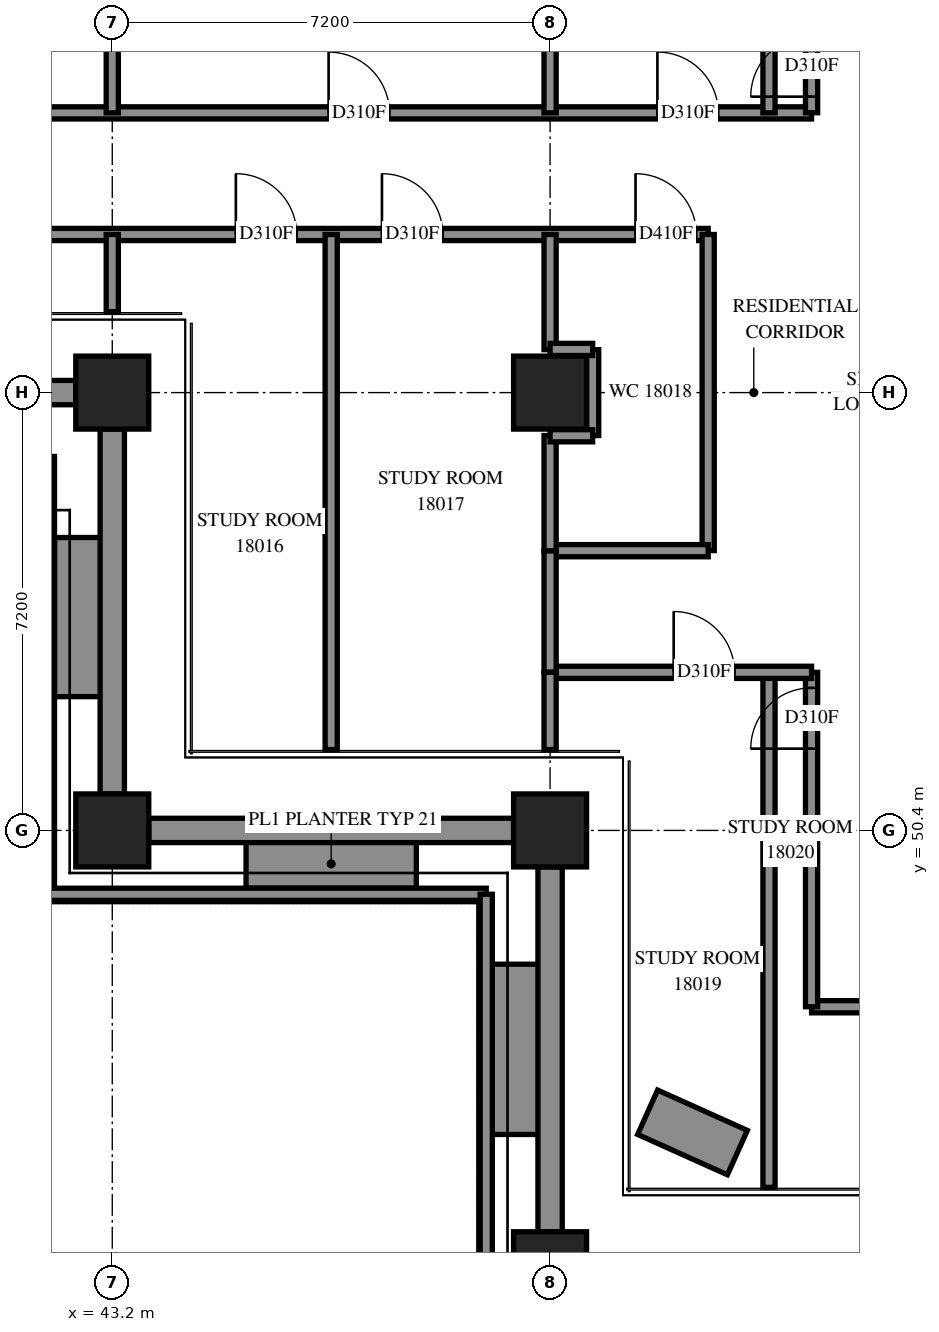
"""IFC4 building model, lengths in metres.
Left out: names, types, materials, properties, quantities, classifications, styles, units other than length and angle.
Written with IfcOpenShell. Run it as: python <this file> out.ifc"""

import sys

from ifc_helpers import new_model, si_unit, direction, frame, frame_2d, origin, origin_2d, place, context, subcontext, project, spatial, polyline, rectangle, outline, extrude, element, fill, save


model = new_model("IFC4")
c1 = context("Model", 3, precision=1e-05, world=origin(), true_north=direction((0.0, 1.0)))
c2 = subcontext(c1, "Body", "Model", "MODEL_VIEW")
j1 = project(units=[si_unit("LENGTHUNIT", "METRE"), si_unit("PLANEANGLEUNIT", "RADIAN")], contexts=[c1])
p1 = place(None, origin())
s1 = spatial("IfcSite", under=j1, at=p1, CompositionType="ELEMENT")
p2 = place(p1, origin())
s2 = spatial("IfcBuilding", under=s1, at=p2, CompositionType="ELEMENT")
p3 = place(p2, frame((0.0, 0.0, 67.8)))
s3 = spatial("IfcBuildingStorey", under=s2, at=p3, CompositionType="ELEMENT", Elevation=67.8)
for number, where, z_axis, x_axis in (
    (1, (43.2, 50.4, 0.0), (0.0, 0.0, 1.0), (1.0, 0.0, 0.0)),
    (2, (43.2, 57.6, 0.0), (0.0, 0.0, 1.0), (1.0, 0.0, 0.0)),
    (3, (50.4, 43.2, 0.0), (0.0, 0.0, 1.0), (1.0, 0.0, 0.0)),
    (4, (50.4, 50.4, 0.0), (0.0, 0.0, 1.0), (1.0, 0.0, 0.0)),
    (5, (50.4, 57.6, 0.0), (0.0, 0.0, 1.0), (1.0, 0.0, 0.0)),
):
    element("IfcColumn", number, at=place(p3, frame(where, z_axis=z_axis, x_axis=x_axis)), inside=s3, PredefinedType="COLUMN", context=c2, shape_type="SweptSolid", body=[
        extrude(rectangle(XDim=1.2, YDim=1.2, at=origin_2d()), origin(), (0.0, 0.0, 1.0), 3.9),
    ])
p4 = place(p3, frame((42.65, 55.217, 0.0), z_axis=(0.0, 0.0, 1.0), x_axis=(0.0, -1.0, 0.0)))
e6 = element("IfcWall", 6, at=p4, inside=s3, PredefinedType="SOLIDWALL", context=c2, shape_type="SweptSolid", body=[
    extrude(rectangle(XDim=2.617, YDim=0.8, at=frame_2d((1.308, 0.0))), origin(), (0.0, 0.0, 1.0), 0.65),
])
for number, where, z_axis, x_axis in (
    (7, (45.4, 49.85, 0.0), (0.0, 0.0, 1.0), (1.0, 0.0, 0.0)),
    (8, (49.85, 48.2, 0.0), (0.0, 0.0, 1.0), (0.0, -1.0, 0.0)),
):
    element("IfcWall", number, at=place(p3, frame(where, z_axis=z_axis, x_axis=x_axis)), inside=s3, PredefinedType="SOLIDWALL", context=c2, shape_type="SweptSolid", body=[
        extrude(rectangle(XDim=2.8, YDim=0.8, at=frame_2d((1.4, 0.0))), origin(), (0.0, 0.0, 1.0), 0.65),
    ])
p5 = place(p3, frame((53.48, 45.102, 0.0), z_axis=(0.0, 0.0, 1.0), x_axis=(-0.9121191364, 0.4099252139, 0.0)))
e9 = element("IfcWall", 9, at=p5, inside=s3, PredefinedType="SOLIDWALL", context=c2, shape_type="SweptSolid", body=[
    extrude(rectangle(XDim=1.618, YDim=0.8, at=frame_2d((0.809, 0.0))), origin(), (0.0, 0.0, 1.0), 0.65),
])
p6 = place(p3, frame((27.75, 56.55, 0.0), z_axis=(0.0, 0.0, 1.0), x_axis=(1.0, 0.0, 0.0)))
e10 = element("IfcWall", 10, at=p6, inside=s3, PredefinedType="SOLIDWALL", context=c2, shape_type="SweptSolid", body=[
    extrude(outline(polyline([(-0.1, -0.1), (14.3, -0.1), (14.5, 0.1), (0.1, 0.1), (-0.1, -0.1)])), origin(), (0.0, 0.0, 1.0), 4.2),
])
p7 = place(p3, frame((42.15, 56.55, 0.0), z_axis=(0.0, 0.0, 1.0), x_axis=(0.0, -1.0, 0.0)))
e11 = element("IfcWall", 11, at=p7, inside=s3, PredefinedType="SOLIDWALL", context=c2, shape_type="SweptSolid", body=[
    extrude(outline(polyline([(0.1, -0.1), (7.3, -0.1), (7.1, 0.1), (-0.1, 0.1), (0.1, -0.1)])), origin(), (0.0, 0.0, 1.0), 4.2),
])
p8 = place(p3, frame((42.15, 49.35, 0.0), z_axis=(0.0, 0.0, 1.0), x_axis=(1.0, 0.0, 0.0)))
e12 = element("IfcWall", 12, at=p8, inside=s3, PredefinedType="SOLIDWALL", context=c2, shape_type="SweptSolid", body=[
    extrude(outline(polyline([(-0.1, -0.1), (7.1, -0.1), (7.3, 0.1), (0.1, 0.1), (-0.1, -0.1)])), origin(), (0.0, 0.0, 1.0), 4.2),
])
p9 = place(p3, frame((49.35, 49.35, 0.0), z_axis=(0.0, 0.0, 1.0), x_axis=(0.0, -1.0, 0.0)))
e13 = element("IfcWall", 13, at=p9, inside=s3, PredefinedType="SOLIDWALL", context=c2, shape_type="SweptSolid", body=[
    extrude(outline(polyline([(0.1, -0.1), (7.3, -0.1), (7.1, 0.1), (-0.1, 0.1), (0.1, -0.1)])), origin(), (0.0, 0.0, 1.0), 4.2),
])
p10 = place(p3, frame((30.6, 60.2, 0.0), z_axis=(0.0, 0.0, 1.0), x_axis=(1.0, 0.0, 0.0)))
e14 = element("IfcWall", 14, at=p10, inside=s3, PredefinedType="PARTITIONING", context=c2, shape_type="SweptSolid", body=[
    extrude(rectangle(XDim=22.4, YDim=0.2, at=frame_2d((11.2, 0.0))), origin(), (0.0, 0.0, 1.0), 3.9),
])
p11 = place(p10, frame((6.254, 0.0, 0.0)))
e15 = element("IfcOpeningElement", 15, at=p11, cuts=e14, PredefinedType="OPENING", context=c2, shape_type="SweptSolid", body=[
    extrude(rectangle(XDim=1.0, YDim=2.1, at=frame_2d((0.5, 1.05))), frame((0.0, 0.11, 0.0), z_axis=(0.0, -1.0, 0.0), x_axis=(1.0, 0.0, 0.0)), (0.0, 0.0, 1.0), 0.22),
])
p12 = place(p10, frame((14.633, 0.0, 0.0)))
e16 = element("IfcOpeningElement", 16, at=p12, cuts=e14, PredefinedType="OPENING", context=c2, shape_type="SweptSolid", body=[
    extrude(rectangle(XDim=1.0, YDim=2.1, at=frame_2d((0.5, 1.05))), frame((0.0, 0.11, 0.0), z_axis=(0.0, -1.0, 0.0), x_axis=(1.0, 0.0, 0.0)), (0.0, 0.0, 1.0), 0.22),
])
p13 = place(p10, frame((17.035, 0.0, 0.0)))
e17 = element("IfcOpeningElement", 17, at=p13, cuts=e14, PredefinedType="OPENING", context=c2, shape_type="SweptSolid", body=[
    extrude(rectangle(XDim=1.0, YDim=2.1, at=frame_2d((0.5, 1.05))), frame((0.0, 0.11, 0.0), z_axis=(0.0, -1.0, 0.0), x_axis=(1.0, 0.0, 0.0)), (0.0, 0.0, 1.0), 0.22),
])
p14 = place(p10, frame((21.205, 0.0, 0.0)))
e18 = element("IfcOpeningElement", 18, at=p14, cuts=e14, PredefinedType="OPENING", context=c2, shape_type="SweptSolid", body=[
    extrude(rectangle(XDim=1.0, YDim=2.1, at=frame_2d((0.5, 1.05))), frame((0.0, 0.11, 0.0), z_axis=(0.0, -1.0, 0.0), x_axis=(1.0, 0.0, 0.0)), (0.0, 0.0, 1.0), 0.22),
])
p15 = place(p3, frame((33.4, 62.2, 0.0), z_axis=(0.0, 0.0, 1.0), x_axis=(1.0, 0.0, 0.0)))
e19 = element("IfcWall", 19, at=p15, inside=s3, PredefinedType="PARTITIONING", context=c2, shape_type="SweptSolid", body=[
    extrude(rectangle(XDim=21.3, YDim=0.2, at=frame_2d((10.65, 0.0))), origin(), (0.0, 0.0, 1.0), 3.9),
])
p16 = place(p15, frame((6.157, 0.0, 0.0)))
e20 = element("IfcOpeningElement", 20, at=p16, cuts=e19, PredefinedType="OPENING", context=c2, shape_type="SweptSolid", body=[
    extrude(rectangle(XDim=1.0, YDim=2.1, at=frame_2d((0.5, 1.05))), frame((0.0, 0.11, 0.0), z_axis=(0.0, -1.0, 0.0), x_axis=(1.0, 0.0, 0.0)), (0.0, 0.0, 1.0), 0.22),
])
p17 = place(p15, frame((13.357, 0.0, 0.0)))
e21 = element("IfcOpeningElement", 21, at=p17, cuts=e19, PredefinedType="OPENING", context=c2, shape_type="SweptSolid", body=[
    extrude(rectangle(XDim=1.0, YDim=2.1, at=frame_2d((0.5, 1.05))), frame((0.0, 0.11, 0.0), z_axis=(0.0, -1.0, 0.0), x_axis=(1.0, 0.0, 0.0)), (0.0, 0.0, 1.0), 0.22),
])
p18 = place(p15, frame((18.765, 0.0, 0.0)))
e22 = element("IfcOpeningElement", 22, at=p18, cuts=e19, PredefinedType="OPENING", context=c2, shape_type="SweptSolid", body=[
    extrude(rectangle(XDim=1.0, YDim=2.1, at=frame_2d((0.5, 1.05))), frame((0.0, 0.11, 0.0), z_axis=(0.0, -1.0, 0.0), x_axis=(1.0, 0.0, 0.0)), (0.0, 0.0, 1.0), 0.22),
])
p19 = place(p3, frame((54.7, 47.5, 0.0), z_axis=(0.0, 0.0, 1.0), x_axis=(1.0, 0.0, 0.0)))
e23 = element("IfcWall", 23, at=p19, inside=s3, PredefinedType="PARTITIONING", context=c2, shape_type="SweptSolid", body=[
    extrude(rectangle(XDim=19.442, YDim=0.2, at=frame_2d((9.721, 0.0))), origin(), (0.0, 0.0, 1.0), 3.9),
])
p20 = place(p19, frame((4.933, 0.0, 0.0)))
e24 = element("IfcOpeningElement", 24, at=p20, cuts=e23, PredefinedType="OPENING", context=c2, shape_type="SweptSolid", body=[
    extrude(rectangle(XDim=1.0, YDim=2.1, at=frame_2d((0.5, 1.05))), frame((0.0, 0.11, 0.0), z_axis=(0.0, -1.0, 0.0), x_axis=(1.0, 0.0, 0.0)), (0.0, 0.0, 1.0), 0.22),
])
p21 = place(p19, frame((7.008, 0.0, 0.0)))
e25 = element("IfcOpeningElement", 25, at=p21, cuts=e23, PredefinedType="OPENING", context=c2, shape_type="SweptSolid", body=[
    extrude(rectangle(XDim=1.0, YDim=2.1, at=frame_2d((0.5, 1.05))), frame((0.0, 0.11, 0.0), z_axis=(0.0, -1.0, 0.0), x_axis=(1.0, 0.0, 0.0)), (0.0, 0.0, 1.0), 0.22),
])
p22 = place(p19, frame((12.133, 0.0, 0.0)))
e26 = element("IfcOpeningElement", 26, at=p22, cuts=e23, PredefinedType="OPENING", context=c2, shape_type="SweptSolid", body=[
    extrude(rectangle(XDim=1.0, YDim=2.1, at=frame_2d((0.5, 1.05))), frame((0.0, 0.11, 0.0), z_axis=(0.0, -1.0, 0.0), x_axis=(1.0, 0.0, 0.0)), (0.0, 0.0, 1.0), 0.22),
])
p23 = place(p19, frame((14.207, 0.0, 0.0)))
e27 = element("IfcOpeningElement", 27, at=p23, cuts=e23, PredefinedType="OPENING", context=c2, shape_type="SweptSolid", body=[
    extrude(rectangle(XDim=1.0, YDim=2.1, at=frame_2d((0.5, 1.05))), frame((0.0, 0.11, 0.0), z_axis=(0.0, -1.0, 0.0), x_axis=(1.0, 0.0, 0.0)), (0.0, 0.0, 1.0), 0.22),
])
for number, where, z_axis, x_axis in (
    (28, (46.8, 51.73, 0.0), (0.0, 0.0, 1.0), (0.0, 1.0, 0.0)),
    (29, (54.0, 44.53, 0.0), (0.0, 0.0, 1.0), (0.0, 1.0, 0.0)),
    (30, (54.0, 62.2, 0.0), (0.0, 0.0, 1.0), (0.0, 1.0, 0.0)),
):
    element("IfcWall", number, at=place(p3, frame(where, z_axis=z_axis, x_axis=x_axis)), inside=s3, PredefinedType="PARTITIONING", context=c2, shape_type="SweptSolid", body=[
        extrude(rectangle(XDim=8.47, YDim=0.2, at=frame_2d((4.235, 0.0))), origin(), (0.0, 0.0, 1.0), 3.9),
    ])
p24 = place(p3, frame((54.7, 47.5, 0.0), z_axis=(0.0, 0.0, 1.0), x_axis=(0.0, 1.0, 0.0)))
e31 = element("IfcWall", 31, at=p24, inside=s3, PredefinedType="PARTITIONING", context=c2, shape_type="SweptSolid", body=[
    extrude(rectangle(XDim=5.5, YDim=0.2, at=frame_2d((2.75, 0.0))), origin(), (0.0, 0.0, 1.0), 3.9),
])
p25 = place(p24, frame((4.245, 0.0, 0.0)))
e32 = element("IfcOpeningElement", 32, at=p25, cuts=e31, PredefinedType="OPENING", context=c2, shape_type="SweptSolid", body=[
    extrude(rectangle(XDim=1.0, YDim=2.1, at=frame_2d((0.5, 1.05))), frame((0.0, 0.11, 0.0), z_axis=(0.0, -1.0, 0.0), x_axis=(1.0, 0.0, 0.0)), (0.0, 0.0, 1.0), 0.22),
])
p26 = place(p3, frame((54.7, 62.202, 0.0), z_axis=(0.0, 0.0, 1.0), x_axis=(0.0, 1.0, 0.0)))
e33 = element("IfcWall", 33, at=p26, inside=s3, PredefinedType="PARTITIONING", context=c2, shape_type="SweptSolid", body=[
    extrude(rectangle(XDim=5.498, YDim=0.2, at=frame_2d((2.749, 0.0))), origin(), (0.0, 0.0, 1.0), 3.9),
])
p27 = place(p26, frame((0.265, 0.0, 0.0)))
e34 = element("IfcOpeningElement", 34, at=p27, cuts=e33, PredefinedType="OPENING", context=c2, shape_type="SweptSolid", body=[
    extrude(rectangle(XDim=1.0, YDim=2.1, at=frame_2d((0.5, 1.05))), frame((0.0, 0.11, 0.0), z_axis=(0.0, -1.0, 0.0), x_axis=(1.0, 0.0, 0.0)), (0.0, 0.0, 1.0), 0.22),
])
p28 = place(p3, frame((53.0, 55.002, 0.0), z_axis=(0.0, 0.0, 1.0), x_axis=(0.0, 1.0, 0.0)))
e35 = element("IfcWall", 35, at=p28, inside=s3, PredefinedType="PARTITIONING", context=c2, shape_type="SweptSolid", body=[
    extrude(rectangle(XDim=5.198, YDim=0.2, at=frame_2d((2.599, 0.0))), origin(), (0.0, 0.0, 1.0), 3.9),
])
p29 = place(p3, frame((50.4, 53.0, 0.0), z_axis=(0.0, 0.0, 1.0), x_axis=(1.0, 0.0, 0.0)))
e36 = element("IfcWall", 36, at=p29, inside=s3, PredefinedType="PARTITIONING", context=c2, shape_type="SweptSolid", body=[
    extrude(rectangle(XDim=4.3, YDim=0.2, at=frame_2d((2.15, 0.0))), origin(), (0.0, 0.0, 1.0), 3.9),
])
p30 = place(p29, frame((2.033, 0.0, 0.0)))
e37 = element("IfcOpeningElement", 37, at=p30, cuts=e36, PredefinedType="OPENING", context=c2, shape_type="SweptSolid", body=[
    extrude(rectangle(XDim=1.0, YDim=2.1, at=frame_2d((0.5, 1.05))), frame((0.0, 0.11, 0.0), z_axis=(0.0, -1.0, 0.0), x_axis=(1.0, 0.0, 0.0)), (0.0, 0.0, 1.0), 0.22),
])
p31 = place(p3, frame((50.4, 55.0, 0.0), z_axis=(0.0, 0.0, 1.0), x_axis=(1.0, 0.0, 0.0)))
e38 = element("IfcWall", 38, at=p31, inside=s3, PredefinedType="PARTITIONING", context=c2, shape_type="SweptSolid", body=[
    extrude(rectangle(XDim=2.6, YDim=0.2, at=frame_2d((1.3, 0.0))), origin(), (0.0, 0.0, 1.0), 3.9),
])
p32 = place(p3, frame((50.4, 53.0, 0.0), z_axis=(0.0, 0.0, 1.0), x_axis=(0.0, 1.0, 0.0)))
e39 = element("IfcWall", 39, at=p32, inside=s3, PredefinedType="PARTITIONING", context=c2, shape_type="SweptSolid", body=[
    extrude(rectangle(XDim=2.0, YDim=0.2, at=frame_2d((1.0, 0.0))), origin(), (0.0, 0.0, 1.0), 3.9),
])
for number, where, z_axis, x_axis in (
    (40, (43.2, 62.2, 0.0), (0.0, 0.0, 1.0), (0.0, 1.0, 0.0)),
    (41, (50.4, 62.2, 0.0), (0.0, 0.0, 1.0), (0.0, 1.0, 0.0)),
):
    element("IfcWall", number, at=place(p3, frame(where, z_axis=z_axis, x_axis=x_axis)), inside=s3, PredefinedType="PARTITIONING", context=c2, shape_type="SweptSolid", body=[
        extrude(rectangle(XDim=1.896, YDim=0.2, at=frame_2d((0.948, 0.0))), origin(), (0.0, 0.0, 1.0), 3.9),
    ])
for number, where, z_axis, x_axis in (
    (42, (50.4, 58.306, 0.0), (0.0, 0.0, 1.0), (0.0, 1.0, 0.0)),
    (43, (50.4, 55.0, 0.0), (0.0, 0.0, 1.0), (0.0, 1.0, 0.0)),
):
    element("IfcWall", number, at=place(p3, frame(where, z_axis=z_axis, x_axis=x_axis)), inside=s3, PredefinedType="PARTITIONING", context=c2, shape_type="SweptSolid", body=[
        extrude(rectangle(XDim=1.894, YDim=0.2, at=frame_2d((0.947, 0.0))), origin(), (0.0, 0.0, 1.0), 3.9),
    ])
p33 = place(p3, frame((51.1, 56.894, 0.0), z_axis=(0.0, 0.0, 1.0), x_axis=(0.0, 1.0, 0.0)))
e44 = element("IfcWall", 44, at=p33, inside=s3, PredefinedType="PARTITIONING", context=c2, shape_type="SweptSolid", body=[
    extrude(rectangle(XDim=1.412, YDim=0.2, at=frame_2d((0.706, 0.0))), origin(), (0.0, 0.0, 1.0), 3.9),
])
for number, where, z_axis, x_axis in (
    (45, (43.2, 58.93, 0.0), (0.0, 0.0, 1.0), (0.0, 1.0, 0.0)),
    (46, (50.4, 51.73, 0.0), (0.0, 0.0, 1.0), (0.0, 1.0, 0.0)),
):
    element("IfcWall", number, at=place(p3, frame(where, z_axis=z_axis, x_axis=x_axis)), inside=s3, PredefinedType="PARTITIONING", context=c2, shape_type="SweptSolid", body=[
        extrude(rectangle(XDim=1.27, YDim=0.2, at=frame_2d((0.635, 0.0))), origin(), (0.0, 0.0, 1.0), 3.9),
    ])
for number, where, z_axis, x_axis in (
    (47, (50.4, 58.31, 0.0), (0.0, 0.0, 1.0), (1.0, 0.0, 0.0)),
    (48, (50.4, 56.89, 0.0), (0.0, 0.0, 1.0), (1.0, 0.0, 0.0)),
):
    element("IfcWall", number, at=place(p3, frame(where, z_axis=z_axis, x_axis=x_axis)), inside=s3, PredefinedType="PARTITIONING", context=c2, shape_type="SweptSolid", body=[
        extrude(rectangle(XDim=0.7, YDim=0.2, at=frame_2d((0.35, 0.0))), origin(), (0.0, 0.0, 1.0), 3.9),
    ])
p34 = place(p12, origin())
e49 = element("IfcDoor", 49, at=p34, inside=s3, OperationType="SINGLE_SWING_LEFT", PredefinedType="DOOR", context=c2, shape_type="SweptSolid", body=[
    extrude(rectangle(XDim=1.0, YDim=2.1, at=frame_2d((0.5, 1.05))), frame((0.0, 0.025, 0.0), z_axis=(0.0, -1.0, 0.0), x_axis=(1.0, 0.0, 0.0)), (0.0, 0.0, 1.0), 0.05),
])
fill(e16, e49)
p35 = place(p13, origin())
e50 = element("IfcDoor", 50, at=p35, inside=s3, OperationType="SINGLE_SWING_RIGHT", PredefinedType="DOOR", context=c2, shape_type="SweptSolid", body=[
    extrude(rectangle(XDim=1.0, YDim=2.1, at=frame_2d((0.5, 1.05))), frame((0.0, 0.025, 0.0), z_axis=(0.0, -1.0, 0.0), x_axis=(1.0, 0.0, 0.0)), (0.0, 0.0, 1.0), 0.05),
])
fill(e17, e50)
p36 = place(p14, origin())
e51 = element("IfcDoor", 51, at=p36, inside=s3, OperationType="SINGLE_SWING_LEFT", PredefinedType="DOOR", context=c2, shape_type="SweptSolid", body=[
    extrude(rectangle(XDim=1.0, YDim=2.1, at=frame_2d((0.5, 1.05))), frame((0.0, 0.025, 0.0), z_axis=(0.0, -1.0, 0.0), x_axis=(1.0, 0.0, 0.0)), (0.0, 0.0, 1.0), 0.05),
])
fill(e18, e51)
p37 = place(p30, origin())
e52 = element("IfcDoor", 52, at=p37, inside=s3, OperationType="SINGLE_SWING_LEFT", PredefinedType="DOOR", context=c2, shape_type="SweptSolid", body=[
    extrude(rectangle(XDim=1.0, YDim=2.1, at=frame_2d((0.5, 1.05))), frame((0.0, 0.025, 0.0), z_axis=(0.0, -1.0, 0.0), x_axis=(1.0, 0.0, 0.0)), (0.0, 0.0, 1.0), 0.05),
])
fill(e37, e52)
p38 = place(p25, origin())
e53 = element("IfcDoor", 53, at=p38, inside=s3, OperationType="SINGLE_SWING_RIGHT", PredefinedType="DOOR", context=c2, shape_type="SweptSolid", body=[
    extrude(rectangle(XDim=1.0, YDim=2.1, at=frame_2d((0.5, 1.05))), frame((0.0, 0.025, 0.0), z_axis=(0.0, -1.0, 0.0), x_axis=(1.0, 0.0, 0.0)), (0.0, 0.0, 1.0), 0.05),
])
fill(e32, e53)
p39 = place(p17, origin())
e54 = element("IfcDoor", 54, at=p39, inside=s3, OperationType="SINGLE_SWING_RIGHT", PredefinedType="DOOR", context=c2, shape_type="SweptSolid", body=[
    extrude(rectangle(XDim=1.0, YDim=2.1, at=frame_2d((0.5, 1.05))), frame((0.0, 0.025, 0.0), z_axis=(0.0, -1.0, 0.0), x_axis=(1.0, 0.0, 0.0)), (0.0, 0.0, 1.0), 0.05),
])
fill(e21, e54)
p40 = place(p18, origin())
e55 = element("IfcDoor", 55, at=p40, inside=s3, OperationType="SINGLE_SWING_RIGHT", PredefinedType="DOOR", context=c2, shape_type="SweptSolid", body=[
    extrude(rectangle(XDim=1.0, YDim=2.1, at=frame_2d((0.5, 1.05))), frame((0.0, 0.025, 0.0), z_axis=(0.0, -1.0, 0.0), x_axis=(1.0, 0.0, 0.0)), (0.0, 0.0, 1.0), 0.05),
])
fill(e22, e55)
p41 = place(p27, origin())
e56 = element("IfcDoor", 56, at=p41, inside=s3, OperationType="SINGLE_SWING_LEFT", PredefinedType="DOOR", context=c2, shape_type="SweptSolid", body=[
    extrude(rectangle(XDim=1.0, YDim=2.1, at=frame_2d((0.5, 1.05))), frame((0.0, 0.025, 0.0), z_axis=(0.0, -1.0, 0.0), x_axis=(1.0, 0.0, 0.0)), (0.0, 0.0, 1.0), 0.05),
])
fill(e34, e56)
save(model, sys.argv[1])
